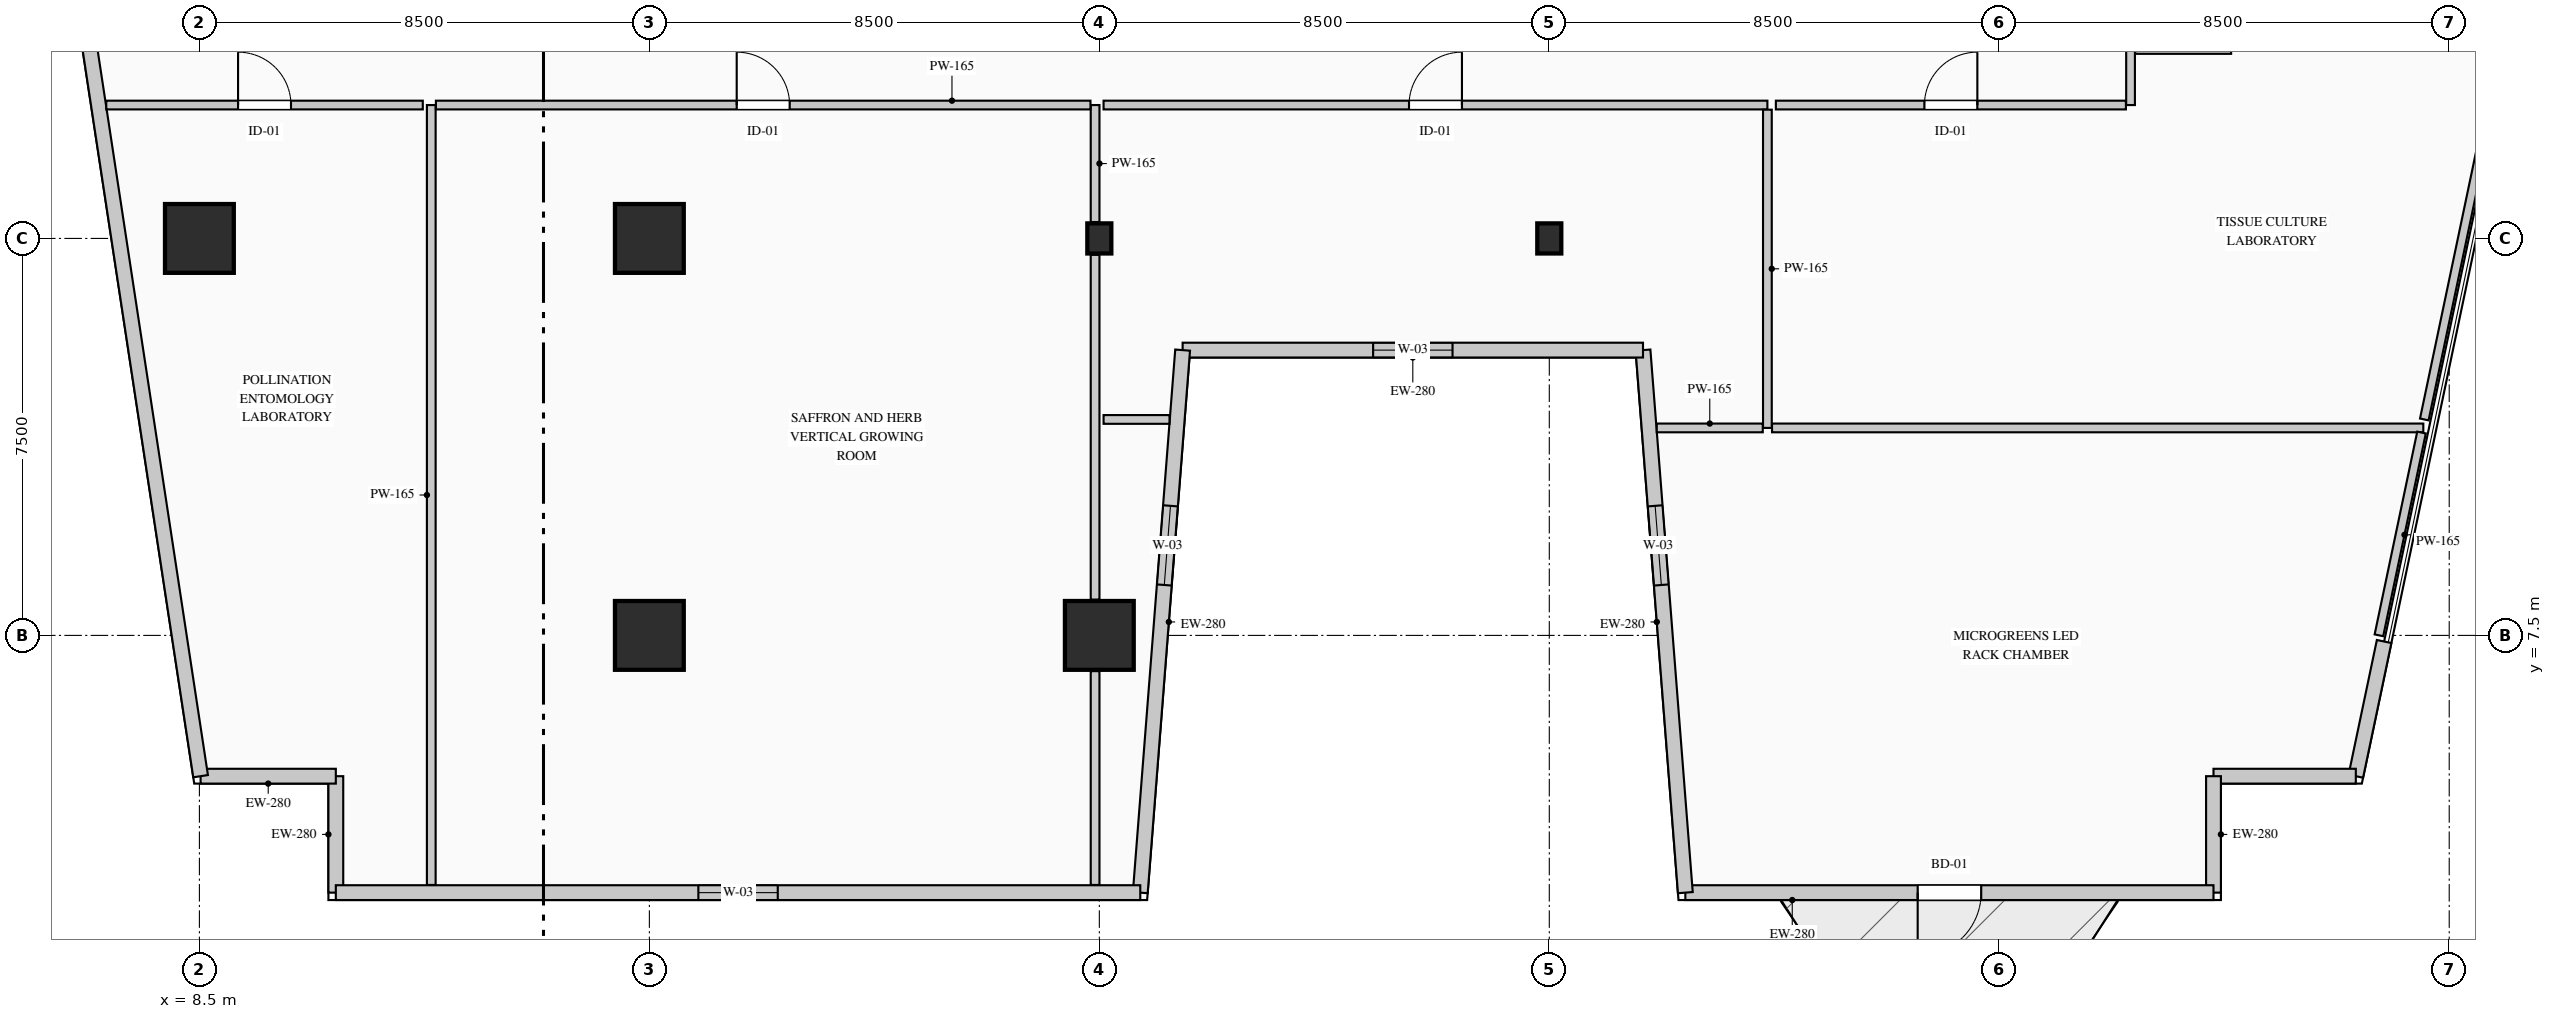
"""IFC4 building model, lengths in metres.
Left out: names, types, materials, properties, quantities, classifications, styles, units other than length and angle.
Written with IfcOpenShell. Run it as: python <this file> out.ifc"""

import sys

from ifc_helpers import new_model, si_unit, direction, frame, frame_2d, origin, origin_2d, place, context, subcontext, project, spatial, rectangle, i_section, extrude, element, fill, save


model = new_model("IFC4")
c1 = context("Model", 3, precision=1e-05, world=origin(), true_north=direction((0.0, 1.0)))
c2 = subcontext(c1, "Body", "Model", "MODEL_VIEW")
j1 = project(units=[si_unit("LENGTHUNIT", "METRE"), si_unit("PLANEANGLEUNIT", "RADIAN")], contexts=[c1])
p1 = place(None, origin())
s1 = spatial("IfcSite", under=j1, at=p1, CompositionType="ELEMENT")
p2 = place(p1, origin())
s2 = spatial("IfcBuilding", under=s1, at=p2, CompositionType="ELEMENT")
p3 = place(p2, frame((0.0, 0.0, 49.0)))
s3 = spatial("IfcBuildingStorey", under=s2, at=p3, CompositionType="ELEMENT", Elevation=49.0)
for number, where, z_axis, x_axis in (
    (1, (8.5, 15.0, 0.0), (0.0, 0.0, 1.0), (1.0, 0.0, 0.0)),
    (2, (17.0, 7.5, 0.0), (0.0, 0.0, 1.0), (1.0, 0.0, 0.0)),
    (3, (17.0, 15.0, 0.0), (0.0, 0.0, 1.0), (1.0, 0.0, 0.0)),
    (4, (25.5, 7.5, 0.0), (0.0, 0.0, 1.0), (1.0, 0.0, 0.0)),
):
    element("IfcColumn", number, at=place(p3, frame(where, z_axis=z_axis, x_axis=x_axis)), inside=s3, PredefinedType="COLUMN", context=c2, shape_type="SweptSolid", body=[
        extrude(rectangle(XDim=1.3, YDim=1.3, at=origin_2d()), origin(), (0.0, 0.0, 1.0), 4.4),
    ])
for number, where, z_axis, x_axis in (
    (5, (25.5, 15.0, 0.0), (0.0, 0.0, 1.0), (1.0, 0.0, 0.0)),
    (6, (34.0, 15.0, 0.0), (0.0, 0.0, 1.0), (1.0, 0.0, 0.0)),
):
    element("IfcColumn", number, at=place(p3, frame(where, z_axis=z_axis, x_axis=x_axis)), inside=s3, PredefinedType="COLUMN", context=c2, shape_type="SweptSolid", body=[
        extrude(i_section(OverallWidth=0.454, OverallDepth=0.569, WebThickness=0.078, FlangeThickness=0.08, FilletRadius=0.015, at=origin_2d()), origin(), (0.0, 0.0, 1.0), 4.4),
    ])
p4 = place(p3, frame((11.077, 2.64, 0.0), z_axis=(0.0, 0.0, 1.0), x_axis=(0.0, 1.0, 0.0)))
e7 = element("IfcWall", 7, at=p4, inside=s3, PredefinedType="STANDARD", context=c2, shape_type="SweptSolid", body=[
    extrude(rectangle(XDim=2.2, YDim=0.28, at=frame_2d((1.1, 0.0))), origin(), (0.0, 0.0, 1.0), 4.1),
])
p5 = place(p3, frame((11.077, 4.84, 0.0), z_axis=(0.0, 0.0, 1.0), x_axis=(-1.0, 0.0, 0.0)))
e8 = element("IfcWall", 8, at=p5, inside=s3, PredefinedType="STANDARD", context=c2, shape_type="SweptSolid", body=[
    extrude(rectangle(XDim=2.554, YDim=0.28, at=frame_2d((1.277, 0.0))), origin(), (0.0, 0.0, 1.0), 4.1),
])
p6 = place(p3, frame((8.523, 4.84, 0.0), z_axis=(0.0, 0.0, 1.0), x_axis=(-0.150394554312, 0.988626055712, 0.0)))
e9 = element("IfcWall", 9, at=p6, inside=s3, PredefinedType="STANDARD", context=c2, shape_type="SweptSolid", body=[
    extrude(rectangle(XDim=36.738, YDim=0.28, at=frame_2d((18.369, 0.0))), origin(), (0.0, 0.0, 1.0), 4.1),
])
p7 = place(p6, frame((22.762, 0.0, 0.9)))
e10 = element("IfcOpeningElement", 10, at=p7, cuts=e9, PredefinedType="OPENING", context=c2, shape_type="SweptSolid", body=[
    extrude(rectangle(XDim=1.5, YDim=1.8, at=frame_2d((0.75, 0.9))), frame((0.0, 0.15, 0.0), z_axis=(0.0, -1.0, 0.0), x_axis=(1.0, 0.0, 0.0)), (0.0, 0.0, 1.0), 0.3),
])
p8 = place(p3, frame((49.77, 7.385, 0.0), z_axis=(0.0, 0.0, 1.0), x_axis=(-0.205551409765, -0.978646319128, 0.0)))
e11 = element("IfcWall", 11, at=p8, inside=s3, PredefinedType="STANDARD", context=c2, shape_type="SweptSolid", body=[
    extrude(rectangle(XDim=2.6, YDim=0.28, at=frame_2d((1.3, 0.0))), origin(), (0.0, 0.0, 1.0), 4.1),
])
p9 = place(p3, frame((49.236, 4.84, 0.0), z_axis=(0.0, 0.0, 1.0), x_axis=(-1.0, 0.0, 0.0)))
e12 = element("IfcWall", 12, at=p9, inside=s3, PredefinedType="STANDARD", context=c2, shape_type="SweptSolid", body=[
    extrude(rectangle(XDim=2.688, YDim=0.28, at=frame_2d((1.344, 0.0))), origin(), (0.0, 0.0, 1.0), 4.1),
])
p10 = place(p3, frame((46.547, 4.84, 0.0), z_axis=(0.0, 0.0, 1.0), x_axis=(0.0, -1.0, 0.0)))
e13 = element("IfcWall", 13, at=p10, inside=s3, PredefinedType="STANDARD", context=c2, shape_type="SweptSolid", body=[
    extrude(rectangle(XDim=2.2, YDim=0.28, at=frame_2d((1.1, 0.0))), origin(), (0.0, 0.0, 1.0), 4.1),
])
p11 = place(p3, frame((46.547, 2.64, 0.0), z_axis=(0.0, 0.0, 1.0), x_axis=(-1.0, 0.0, 0.0)))
e14 = element("IfcWall", 14, at=p11, inside=s3, PredefinedType="STANDARD", context=c2, shape_type="SweptSolid", body=[
    extrude(rectangle(XDim=9.977, YDim=0.28, at=frame_2d((4.989, 0.0))), origin(), (0.0, 0.0, 1.0), 4.1),
])
p12 = place(p11, frame((4.388, 0.0, 0.0)))
e15 = element("IfcOpeningElement", 15, at=p12, cuts=e14, PredefinedType="OPENING", context=c2, shape_type="SweptSolid", body=[
    extrude(rectangle(XDim=1.2, YDim=2.2, at=frame_2d((0.6, 1.1))), frame((0.0, 0.15, 0.0), z_axis=(0.0, -1.0, 0.0), x_axis=(1.0, 0.0, 0.0)), (0.0, 0.0, 1.0), 0.3),
])
p13 = place(p3, frame((36.57, 2.64, 0.0), z_axis=(0.0, 0.0, 1.0), x_axis=(-0.077816860153, 0.996967670627, 0.0)))
e16 = element("IfcWall", 16, at=p13, inside=s3, PredefinedType="STANDARD", context=c2, shape_type="SweptSolid", body=[
    extrude(rectangle(XDim=10.281, YDim=0.28, at=frame_2d((5.141, 0.0))), origin(), (0.0, 0.0, 1.0), 4.1),
])
p14 = place(p13, frame((5.83, 0.0, 0.9)))
e17 = element("IfcOpeningElement", 17, at=p14, cuts=e16, PredefinedType="OPENING", context=c2, shape_type="SweptSolid", body=[
    extrude(rectangle(XDim=1.5, YDim=1.8, at=frame_2d((0.75, 0.9))), frame((0.0, 0.15, 0.0), z_axis=(0.0, -1.0, 0.0), x_axis=(1.0, 0.0, 0.0)), (0.0, 0.0, 1.0), 0.3),
])
p15 = place(p3, frame((35.77, 12.89, 0.0), z_axis=(0.0, 0.0, 1.0), x_axis=(-1.0, 0.0, 0.0)))
e18 = element("IfcWall", 18, at=p15, inside=s3, PredefinedType="STANDARD", context=c2, shape_type="SweptSolid", body=[
    extrude(rectangle(XDim=8.697, YDim=0.28, at=frame_2d((4.348, 0.0))), origin(), (0.0, 0.0, 1.0), 4.1),
])
p16 = place(p15, frame((3.598, 0.0, 0.9)))
e19 = element("IfcOpeningElement", 19, at=p16, cuts=e18, PredefinedType="OPENING", context=c2, shape_type="SweptSolid", body=[
    extrude(rectangle(XDim=1.5, YDim=1.8, at=frame_2d((0.75, 0.9))), frame((0.0, 0.15, 0.0), z_axis=(0.0, -1.0, 0.0), x_axis=(1.0, 0.0, 0.0)), (0.0, 0.0, 1.0), 0.3),
])
p17 = place(p3, frame((27.073, 12.89, 0.0), z_axis=(0.0, 0.0, 1.0), x_axis=(-0.077816860153, -0.996967670627, 0.0)))
e20 = element("IfcWall", 20, at=p17, inside=s3, PredefinedType="STANDARD", context=c2, shape_type="SweptSolid", body=[
    extrude(rectangle(XDim=10.281, YDim=0.28, at=frame_2d((5.141, 0.0))), origin(), (0.0, 0.0, 1.0), 4.1),
])
p18 = place(p17, frame((2.951, 0.0, 0.9)))
e21 = element("IfcOpeningElement", 21, at=p18, cuts=e20, PredefinedType="OPENING", context=c2, shape_type="SweptSolid", body=[
    extrude(rectangle(XDim=1.5, YDim=1.8, at=frame_2d((0.75, 0.9))), frame((0.0, 0.15, 0.0), z_axis=(0.0, -1.0, 0.0), x_axis=(1.0, 0.0, 0.0)), (0.0, 0.0, 1.0), 0.3),
])
p19 = place(p3, frame((26.273, 2.64, 0.0), z_axis=(0.0, 0.0, 1.0), x_axis=(-1.0, 0.0, 0.0)))
e22 = element("IfcWall", 22, at=p19, inside=s3, PredefinedType="STANDARD", context=c2, shape_type="SweptSolid", body=[
    extrude(rectangle(XDim=15.197, YDim=0.28, at=frame_2d((7.598, 0.0))), origin(), (0.0, 0.0, 1.0), 4.1),
])
p20 = place(p19, frame((6.848, 0.0, 0.9)))
e23 = element("IfcOpeningElement", 23, at=p20, cuts=e22, PredefinedType="OPENING", context=c2, shape_type="SweptSolid", body=[
    extrude(rectangle(XDim=1.5, YDim=1.8, at=frame_2d((0.75, 0.9))), frame((0.0, 0.15, 0.0), z_axis=(0.0, -1.0, 0.0), x_axis=(1.0, 0.0, 0.0)), (0.0, 0.0, 1.0), 0.3),
])
p21 = place(p3, frame((25.42, 17.52, 0.0), z_axis=(0.0, 0.0, 1.0), x_axis=(0.0, -1.0, 0.0)))
e24 = element("IfcWall", 24, at=p21, inside=s3, PredefinedType="PARTITIONING", context=c2, shape_type="SweptSolid", body=[
    extrude(rectangle(XDim=2.21, YDim=0.165, at=frame_2d((1.105, 0.0))), origin(), (0.0, 0.0, 1.0), 3.285),
])
p22 = place(p3, frame((25.42, 14.69, 0.0), z_axis=(0.0, 0.0, 1.0), x_axis=(0.0, -1.0, 0.0)))
e25 = element("IfcWall", 25, at=p22, inside=s3, PredefinedType="PARTITIONING", context=c2, shape_type="SweptSolid", body=[
    extrude(rectangle(XDim=6.515, YDim=0.165, at=frame_2d((3.258, 0.0))), origin(), (0.0, 0.0, 1.0), 3.385),
])
p23 = place(p3, frame((25.42, 6.825, 0.0), z_axis=(0.0, 0.0, 1.0), x_axis=(0.0, -1.0, 0.0)))
e26 = element("IfcWall", 26, at=p23, inside=s3, PredefinedType="PARTITIONING", context=c2, shape_type="SweptSolid", body=[
    extrude(rectangle(XDim=4.04, YDim=0.165, at=frame_2d((2.02, 0.0))), origin(), (0.0, 0.0, 1.0), 4.1),
])
p24 = place(p3, frame((12.88, 2.785, 0.0), z_axis=(0.0, 0.0, 1.0), x_axis=(0.0, 1.0, 0.0)))
e27 = element("IfcWall", 27, at=p24, inside=s3, PredefinedType="PARTITIONING", context=c2, shape_type="SweptSolid", body=[
    extrude(rectangle(XDim=14.735, YDim=0.165, at=frame_2d((7.368, 0.0))), origin(), (0.0, 0.0, 1.0), 4.1),
])
p25 = place(p3, frame((12.968, 17.52, 0.0), z_axis=(0.0, 0.0, 1.0), x_axis=(1.0, 0.0, 0.0)))
e28 = element("IfcWall", 28, at=p25, inside=s3, PredefinedType="PARTITIONING", context=c2, shape_type="SweptSolid", body=[
    extrude(rectangle(XDim=12.365, YDim=0.165, at=frame_2d((6.183, 0.0))), origin(), (0.0, 0.0, 1.0), 4.1),
])
p26 = place(p25, frame((5.683, 0.0, 0.0)))
e29 = element("IfcOpeningElement", 29, at=p26, cuts=e28, PredefinedType="OPENING", context=c2, shape_type="SweptSolid", body=[
    extrude(rectangle(XDim=1.0, YDim=2.15, at=frame_2d((0.5, 1.075))), frame((0.0, 0.093, 0.0), z_axis=(0.0, -1.0, 0.0), x_axis=(1.0, 0.0, 0.0)), (0.0, 0.0, 1.0), 0.185),
])
p27 = place(p3, frame((26.826, 11.58, 0.0), z_axis=(0.0, 0.0, 1.0), x_axis=(-1.0, 0.0, 0.0)))
e30 = element("IfcWall", 30, at=p27, inside=s3, PredefinedType="PARTITIONING", context=c2, shape_type="SweptSolid", body=[
    extrude(rectangle(XDim=1.246, YDim=0.165, at=frame_2d((0.623, 0.0))), origin(), (0.0, 0.0, 1.0), 4.1),
])
p28 = place(p3, frame((25.58, 17.52, 0.0), z_axis=(0.0, 0.0, 1.0), x_axis=(1.0, 0.0, 0.0)))
e31 = element("IfcWall", 31, at=p28, inside=s3, PredefinedType="PARTITIONING", context=c2, shape_type="SweptSolid", body=[
    extrude(rectangle(XDim=12.54, YDim=0.165, at=frame_2d((6.27, 0.0))), origin(), (0.0, 0.0, 1.0), 3.785),
])
p29 = place(p28, frame((5.77, 0.0, 0.0)))
e32 = element("IfcOpeningElement", 32, at=p29, cuts=e31, PredefinedType="OPENING", context=c2, shape_type="SweptSolid", body=[
    extrude(rectangle(XDim=1.0, YDim=2.15, at=frame_2d((0.5, 1.075))), frame((0.0, 0.093, 0.0), z_axis=(0.0, -1.0, 0.0), x_axis=(1.0, 0.0, 0.0)), (0.0, 0.0, 1.0), 0.185),
])
p30 = place(p3, frame((38.12, 17.433, 0.0), z_axis=(0.0, 0.0, 1.0), x_axis=(0.0, -1.0, 0.0)))
e33 = element("IfcWall", 33, at=p30, inside=s3, PredefinedType="PARTITIONING", context=c2, shape_type="SweptSolid", body=[
    extrude(rectangle(XDim=6.013, YDim=0.165, at=frame_2d((3.006, 0.0))), origin(), (0.0, 0.0, 1.0), 4.1),
])
p31 = place(p3, frame((36.03, 11.42, 0.0), z_axis=(0.0, 0.0, 1.0), x_axis=(1.0, 0.0, 0.0)))
e34 = element("IfcWall", 34, at=p31, inside=s3, PredefinedType="PARTITIONING", context=c2, shape_type="SweptSolid", body=[
    extrude(rectangle(XDim=2.002, YDim=0.165, at=frame_2d((1.001, 0.0))), origin(), (0.0, 0.0, 1.0), 4.1),
])
p32 = place(p3, frame((38.208, 11.42, 0.0), z_axis=(0.0, 0.0, 1.0), x_axis=(1.0, 0.0, 0.0)))
e35 = element("IfcWall", 35, at=p32, inside=s3, PredefinedType="PARTITIONING", context=c2, shape_type="SweptSolid", body=[
    extrude(rectangle(XDim=12.303, YDim=0.165, at=frame_2d((6.151, 0.0))), origin(), (0.0, 0.0, 1.0), 4.1),
])
p33 = place(p3, frame((50.477, 11.333, 0.0), z_axis=(0.0, 0.0, 1.0), x_axis=(-0.205570398428, -0.978642330624, 0.0)))
e36 = element("IfcWall", 36, at=p33, inside=s3, PredefinedType="PARTITIONING", context=c2, shape_type="SweptSolid", body=[
    extrude(rectangle(XDim=3.914, YDim=0.165, at=frame_2d((1.957, 0.0))), origin(), (0.0, 0.0, 1.0), 4.1),
])
p34 = place(p3, frame((6.74, 17.52, 0.0), z_axis=(0.0, 0.0, 1.0), x_axis=(1.0, 0.0, 0.0)))
e37 = element("IfcWall", 37, at=p34, inside=s3, PredefinedType="PARTITIONING", context=c2, shape_type="SweptSolid", body=[
    extrude(rectangle(XDim=5.979, YDim=0.165, at=frame_2d((2.99, 0.0))), origin(), (0.0, 0.0, 1.0), 4.1),
])
p35 = place(p34, frame((2.49, 0.0, 0.0)))
e38 = element("IfcOpeningElement", 38, at=p35, cuts=e37, PredefinedType="OPENING", context=c2, shape_type="SweptSolid", body=[
    extrude(rectangle(XDim=1.0, YDim=2.15, at=frame_2d((0.5, 1.075))), frame((0.0, 0.093, 0.0), z_axis=(0.0, -1.0, 0.0), x_axis=(1.0, 0.0, 0.0)), (0.0, 0.0, 1.0), 0.185),
])
p36 = place(p3, frame((44.98, 17.52, 0.0), z_axis=(0.0, 0.0, 1.0), x_axis=(0.0, 1.0, 0.0)))
e39 = element("IfcWall", 39, at=p36, inside=s3, PredefinedType="PARTITIONING", context=c2, shape_type="SweptSolid", body=[
    extrude(rectangle(XDim=1.05, YDim=0.165, at=frame_2d((0.525, 0.0))), origin(), (0.0, 0.0, 1.0), 4.1),
])
p37 = place(p3, frame((45.067, 18.57, 0.0), z_axis=(0.0, 0.0, 1.0), x_axis=(1.0, 0.0, 0.0)))
e40 = element("IfcWall", 40, at=p37, inside=s3, PredefinedType="PARTITIONING", context=c2, shape_type="SweptSolid", body=[
    extrude(rectangle(XDim=1.812, YDim=0.165, at=frame_2d((0.906, 0.0))), origin(), (0.0, 0.0, 1.0), 4.1),
])
p38 = place(p3, frame((52.77, 22.248, 0.0), z_axis=(0.0, 0.0, 1.0), x_axis=(-0.205565714744, -0.978643314452, 0.0)))
e41 = element("IfcWall", 41, at=p38, inside=s3, PredefinedType="PARTITIONING", context=c2, shape_type="SweptSolid", body=[
    extrude(rectangle(XDim=10.9, YDim=0.165, at=frame_2d((5.45, 0.0))), origin(), (0.0, 0.0, 1.0), 4.1),
])
p39 = place(p3, frame((38.28, 17.52, 0.0), z_axis=(0.0, 0.0, 1.0), x_axis=(1.0, 0.0, 0.0)))
e42 = element("IfcWall", 42, at=p39, inside=s3, PredefinedType="PARTITIONING", context=c2, shape_type="SweptSolid", body=[
    extrude(rectangle(XDim=6.613, YDim=0.165, at=frame_2d((3.306, 0.0))), origin(), (0.0, 0.0, 1.0), 4.1),
])
p40 = place(p39, frame((2.806, 0.0, 0.0)))
e43 = element("IfcOpeningElement", 43, at=p40, cuts=e42, PredefinedType="OPENING", context=c2, shape_type="SweptSolid", body=[
    extrude(rectangle(XDim=1.0, YDim=2.15, at=frame_2d((0.5, 1.075))), frame((0.0, 0.093, 0.0), z_axis=(0.0, -1.0, 0.0), x_axis=(1.0, 0.0, 0.0)), (0.0, 0.0, 1.0), 0.185),
])
p41 = place(p12, origin())
e44 = element("IfcDoor", 44, at=p41, inside=s3, OperationType="SINGLE_SWING_RIGHT", PredefinedType="DOOR", context=c2, shape_type="SweptSolid", body=[
    extrude(rectangle(XDim=1.2, YDim=2.2, at=frame_2d((0.6, 1.1))), frame((0.0, 0.025, 0.0), z_axis=(0.0, -1.0, 0.0), x_axis=(1.0, 0.0, 0.0)), (0.0, 0.0, 1.0), 0.05),
])
fill(e15, e44)
p42 = place(p14, origin())
e45 = element("IfcWindow", 45, at=p42, inside=s3, PartitioningType="SINGLE_PANEL", PredefinedType="WINDOW", context=c2, shape_type="SweptSolid", body=[
    extrude(rectangle(XDim=1.5, YDim=1.8, at=frame_2d((0.75, 0.9))), frame((0.0, 0.03, 0.0), z_axis=(0.0, -1.0, 0.0), x_axis=(1.0, 0.0, 0.0)), (0.0, 0.0, 1.0), 0.06),
])
fill(e17, e45)
p43 = place(p16, origin())
e46 = element("IfcWindow", 46, at=p43, inside=s3, PartitioningType="SINGLE_PANEL", PredefinedType="WINDOW", context=c2, shape_type="SweptSolid", body=[
    extrude(rectangle(XDim=1.5, YDim=1.8, at=frame_2d((0.75, 0.9))), frame((0.0, 0.03, 0.0), z_axis=(0.0, -1.0, 0.0), x_axis=(1.0, 0.0, 0.0)), (0.0, 0.0, 1.0), 0.06),
])
fill(e19, e46)
p44 = place(p18, origin())
e47 = element("IfcWindow", 47, at=p44, inside=s3, PartitioningType="SINGLE_PANEL", PredefinedType="WINDOW", context=c2, shape_type="SweptSolid", body=[
    extrude(rectangle(XDim=1.5, YDim=1.8, at=frame_2d((0.75, 0.9))), frame((0.0, 0.03, 0.0), z_axis=(0.0, -1.0, 0.0), x_axis=(1.0, 0.0, 0.0)), (0.0, 0.0, 1.0), 0.06),
])
fill(e21, e47)
p45 = place(p20, origin())
e48 = element("IfcWindow", 48, at=p45, inside=s3, PartitioningType="SINGLE_PANEL", PredefinedType="WINDOW", context=c2, shape_type="SweptSolid", body=[
    extrude(rectangle(XDim=1.5, YDim=1.8, at=frame_2d((0.75, 0.9))), frame((0.0, 0.03, 0.0), z_axis=(0.0, -1.0, 0.0), x_axis=(1.0, 0.0, 0.0)), (0.0, 0.0, 1.0), 0.06),
])
fill(e23, e48)
p46 = place(p26, origin())
e49 = element("IfcDoor", 49, at=p46, inside=s3, OperationType="SINGLE_SWING_LEFT", PredefinedType="DOOR", context=c2, shape_type="SweptSolid", body=[
    extrude(rectangle(XDim=1.0, YDim=2.15, at=frame_2d((0.5, 1.075))), frame((0.0, 0.025, 0.0), z_axis=(0.0, -1.0, 0.0), x_axis=(1.0, 0.0, 0.0)), (0.0, 0.0, 1.0), 0.05),
])
fill(e29, e49)
p47 = place(p29, origin())
e50 = element("IfcDoor", 50, at=p47, inside=s3, OperationType="SINGLE_SWING_RIGHT", PredefinedType="DOOR", context=c2, shape_type="SweptSolid", body=[
    extrude(rectangle(XDim=1.0, YDim=2.15, at=frame_2d((0.5, 1.075))), frame((0.0, 0.025, 0.0), z_axis=(0.0, -1.0, 0.0), x_axis=(1.0, 0.0, 0.0)), (0.0, 0.0, 1.0), 0.05),
])
fill(e32, e50)
p48 = place(p35, origin())
e51 = element("IfcDoor", 51, at=p48, inside=s3, OperationType="SINGLE_SWING_LEFT", PredefinedType="DOOR", context=c2, shape_type="SweptSolid", body=[
    extrude(rectangle(XDim=1.0, YDim=2.15, at=frame_2d((0.5, 1.075))), frame((0.0, 0.025, 0.0), z_axis=(0.0, -1.0, 0.0), x_axis=(1.0, 0.0, 0.0)), (0.0, 0.0, 1.0), 0.05),
])
fill(e38, e51)
p49 = place(p40, origin())
e52 = element("IfcDoor", 52, at=p49, inside=s3, OperationType="SINGLE_SWING_RIGHT", PredefinedType="DOOR", context=c2, shape_type="SweptSolid", body=[
    extrude(rectangle(XDim=1.0, YDim=2.15, at=frame_2d((0.5, 1.075))), frame((0.0, 0.025, 0.0), z_axis=(0.0, -1.0, 0.0), x_axis=(1.0, 0.0, 0.0)), (0.0, 0.0, 1.0), 0.05),
])
fill(e43, e52)
save(model, sys.argv[1])
